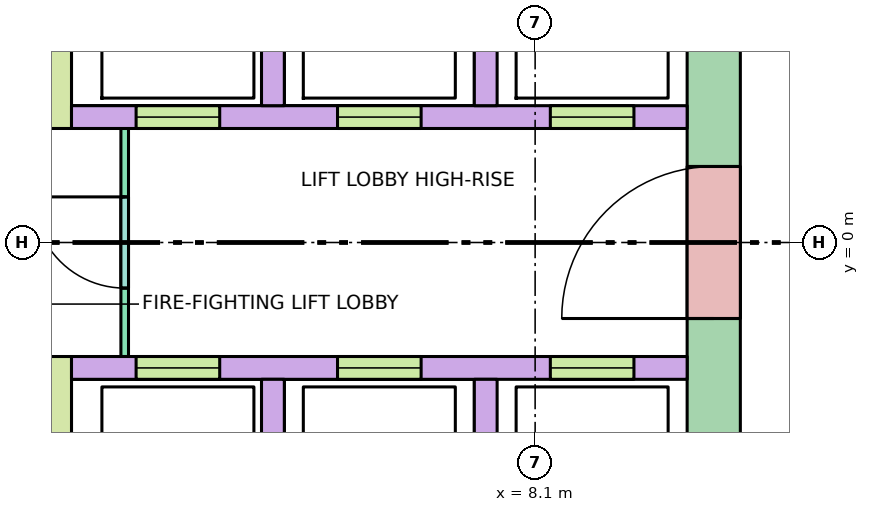
"""IFC4 building model, lengths in metres.
Left out: names, types, materials, properties, quantities, classifications, styles, units other than length and angle.
Written with IfcOpenShell. Run it as: python <this file> out.ifc"""

import sys

from ifc_helpers import new_model, si_unit, direction, frame, frame_2d, origin, place, context, subcontext, project, spatial, rectangle, extrude, element, fill, save


model = new_model("IFC4")
c1 = context("Model", 3, precision=1e-05, world=origin(), true_north=direction((0.0, 1.0)))
c2 = subcontext(c1, "Body", "Model", "MODEL_VIEW")
j1 = project(units=[si_unit("LENGTHUNIT", "METRE"), si_unit("PLANEANGLEUNIT", "RADIAN")], contexts=[c1])
p1 = place(None, origin())
s1 = spatial("IfcSite", under=j1, at=p1, CompositionType="ELEMENT")
p2 = place(p1, origin())
s2 = spatial("IfcBuilding", under=s1, at=p2, CompositionType="ELEMENT")
p3 = place(p2, frame((0.0, 0.0, 237.2)))
s3 = spatial("IfcBuildingStorey", under=s2, at=p3, CompositionType="ELEMENT", Elevation=237.2)
p4 = place(p3, frame((10.45, -5.13, -0.28), z_axis=(0.0, 0.0, 1.0), x_axis=(0.0, 1.0, 0.0)))
e1 = element("IfcWall", 1, at=p4, inside=s3, PredefinedType="SHEAR", context=c2, shape_type="SweptSolid", body=[
    extrude(rectangle(XDim=10.26, YDim=0.7, at=frame_2d((5.13, 0.0))), origin(), (0.0, 0.0, 1.0), 3.7),
])
p5 = place(p4, frame((4.13, 0.0, 0.28)))
e2 = element("IfcOpeningElement", 2, at=p5, cuts=e1, PredefinedType="OPENING", context=c2, shape_type="SweptSolid", body=[
    extrude(rectangle(XDim=2.0, YDim=2.1, at=frame_2d((1.0, 1.05))), frame((0.0, 0.36, 0.0), z_axis=(0.0, -1.0, 0.0), x_axis=(1.0, 0.0, 0.0)), (0.0, 0.0, 1.0), 0.72),
])
p6 = place(p3, frame((2.0, 1.65, 0.0), z_axis=(0.0, 0.0, 1.0), x_axis=(1.0, 0.0, 0.0)))
e3 = element("IfcWall", 3, at=p6, inside=s3, PredefinedType="SOLIDWALL", context=c2, shape_type="SweptSolid", body=[
    extrude(rectangle(XDim=8.1, YDim=0.3, at=frame_2d((4.05, 0.0))), origin(), (0.0, 0.0, 1.0), 3.42),
])
p7 = place(p6, frame((0.85, 0.0, 0.0)))
e4 = element("IfcOpeningElement", 4, at=p7, cuts=e3, PredefinedType="OPENING", context=c2, shape_type="SweptSolid", body=[
    extrude(rectangle(XDim=1.1, YDim=2.1, at=frame_2d((0.55, 1.05))), frame((0.0, 0.16, 0.0), z_axis=(0.0, -1.0, 0.0), x_axis=(1.0, 0.0, 0.0)), (0.0, 0.0, 1.0), 0.32),
])
p8 = place(p6, frame((3.5, 0.0, 0.0)))
e5 = element("IfcOpeningElement", 5, at=p8, cuts=e3, PredefinedType="OPENING", context=c2, shape_type="SweptSolid", body=[
    extrude(rectangle(XDim=1.1, YDim=2.1, at=frame_2d((0.55, 1.05))), frame((0.0, 0.16, 0.0), z_axis=(0.0, -1.0, 0.0), x_axis=(1.0, 0.0, 0.0)), (0.0, 0.0, 1.0), 0.32),
])
p9 = place(p6, frame((6.3, 0.0, 0.0)))
e6 = element("IfcOpeningElement", 6, at=p9, cuts=e3, PredefinedType="OPENING", context=c2, shape_type="SweptSolid", body=[
    extrude(rectangle(XDim=1.1, YDim=2.1, at=frame_2d((0.55, 1.05))), frame((0.0, 0.16, 0.0), z_axis=(0.0, -1.0, 0.0), x_axis=(1.0, 0.0, 0.0)), (0.0, 0.0, 1.0), 0.32),
])
p10 = place(p3, frame((2.0, -1.65, 0.0), z_axis=(0.0, 0.0, 1.0), x_axis=(1.0, 0.0, 0.0)))
e7 = element("IfcWall", 7, at=p10, inside=s3, PredefinedType="SOLIDWALL", context=c2, shape_type="SweptSolid", body=[
    extrude(rectangle(XDim=8.1, YDim=0.3, at=frame_2d((4.05, 0.0))), origin(), (0.0, 0.0, 1.0), 3.42),
])
p11 = place(p10, frame((0.85, 0.0, 0.0)))
e8 = element("IfcOpeningElement", 8, at=p11, cuts=e7, PredefinedType="OPENING", context=c2, shape_type="SweptSolid", body=[
    extrude(rectangle(XDim=1.1, YDim=2.1, at=frame_2d((0.55, 1.05))), frame((0.0, 0.16, 0.0), z_axis=(0.0, -1.0, 0.0), x_axis=(1.0, 0.0, 0.0)), (0.0, 0.0, 1.0), 0.32),
])
p12 = place(p10, frame((3.5, 0.0, 0.0)))
e9 = element("IfcOpeningElement", 9, at=p12, cuts=e7, PredefinedType="OPENING", context=c2, shape_type="SweptSolid", body=[
    extrude(rectangle(XDim=1.1, YDim=2.1, at=frame_2d((0.55, 1.05))), frame((0.0, 0.16, 0.0), z_axis=(0.0, -1.0, 0.0), x_axis=(1.0, 0.0, 0.0)), (0.0, 0.0, 1.0), 0.32),
])
p13 = place(p10, frame((6.3, 0.0, 0.0)))
e10 = element("IfcOpeningElement", 10, at=p13, cuts=e7, PredefinedType="OPENING", context=c2, shape_type="SweptSolid", body=[
    extrude(rectangle(XDim=1.1, YDim=2.1, at=frame_2d((0.55, 1.05))), frame((0.0, 0.16, 0.0), z_axis=(0.0, -1.0, 0.0), x_axis=(1.0, 0.0, 0.0)), (0.0, 0.0, 1.0), 0.32),
])
for number, where, z_axis, x_axis in (
    (11, (4.65, 1.8, 0.0), (0.0, 0.0, 1.0), (0.0, 1.0, 0.0)),
    (12, (4.65, -4.2, 0.0), (0.0, 0.0, 1.0), (0.0, 1.0, 0.0)),
    (13, (7.45, 1.8, 0.0), (0.0, 0.0, 1.0), (0.0, 1.0, 0.0)),
    (14, (7.45, -4.2, 0.0), (0.0, 0.0, 1.0), (0.0, 1.0, 0.0)),
):
    element("IfcWall", number, at=place(p3, frame(where, z_axis=z_axis, x_axis=x_axis)), inside=s3, PredefinedType="SOLIDWALL", context=c2, shape_type="SweptSolid", body=[
        extrude(rectangle(XDim=2.4, YDim=0.3, at=frame_2d((1.2, 0.0))), origin(), (0.0, 0.0, 1.0), 3.42),
    ])
for number, where, z_axis, x_axis in (
    (15, (1.85, 1.5, 0.0), (0.0, 0.0, 1.0), (0.0, 1.0, 0.0)),
    (16, (1.85, -8.1, 0.0), (0.0, 0.0, 1.0), (0.0, 1.0, 0.0)),
):
    element("IfcWall", number, at=place(p3, frame(where, z_axis=z_axis, x_axis=x_axis)), inside=s3, PredefinedType="SHEAR", context=c2, shape_type="SweptSolid", body=[
        extrude(rectangle(XDim=6.6, YDim=0.3, at=frame_2d((3.3, 0.0))), origin(), (0.0, 0.0, 1.0), 3.42),
    ])
p14 = place(p3, frame((2.7, -1.5, 0.0), z_axis=(0.0, 0.0, 1.0), x_axis=(0.0, 1.0, 0.0)))
e17 = element("IfcWall", 17, at=p14, inside=s3, PredefinedType="PARTITIONING", context=c2, shape_type="SweptSolid", body=[
    extrude(rectangle(XDim=3.0, YDim=0.1, at=frame_2d((1.5, 0.0))), origin(), (0.0, 0.0, 1.0), 3.42),
])
p15 = place(p14, frame((0.9, 0.0, 0.0)))
e18 = element("IfcOpeningElement", 18, at=p15, cuts=e17, PredefinedType="OPENING", context=c2, shape_type="SweptSolid", body=[
    extrude(rectangle(XDim=1.2, YDim=2.1, at=frame_2d((0.6, 1.05))), frame((0.0, 0.06, 0.0), z_axis=(0.0, -1.0, 0.0), x_axis=(1.0, 0.0, 0.0)), (0.0, 0.0, 1.0), 0.12),
])
p16 = place(p7, origin())
e19 = element("IfcDoor", 19, at=p16, inside=s3, OperationType="DOUBLE_DOOR_SLIDING", PredefinedType="DOOR", context=c2, shape_type="SweptSolid", body=[
    extrude(rectangle(XDim=1.1, YDim=2.1, at=frame_2d((0.55, 1.05))), frame((0.0, 0.025, 0.0), z_axis=(0.0, -1.0, 0.0), x_axis=(1.0, 0.0, 0.0)), (0.0, 0.0, 1.0), 0.05),
])
fill(e4, e19)
p17 = place(p8, origin())
e20 = element("IfcDoor", 20, at=p17, inside=s3, OperationType="DOUBLE_DOOR_SLIDING", PredefinedType="DOOR", context=c2, shape_type="SweptSolid", body=[
    extrude(rectangle(XDim=1.1, YDim=2.1, at=frame_2d((0.55, 1.05))), frame((0.0, 0.025, 0.0), z_axis=(0.0, -1.0, 0.0), x_axis=(1.0, 0.0, 0.0)), (0.0, 0.0, 1.0), 0.05),
])
fill(e5, e20)
p18 = place(p9, origin())
e21 = element("IfcDoor", 21, at=p18, inside=s3, OperationType="DOUBLE_DOOR_SLIDING", PredefinedType="DOOR", context=c2, shape_type="SweptSolid", body=[
    extrude(rectangle(XDim=1.1, YDim=2.1, at=frame_2d((0.55, 1.05))), frame((0.0, 0.025, 0.0), z_axis=(0.0, -1.0, 0.0), x_axis=(1.0, 0.0, 0.0)), (0.0, 0.0, 1.0), 0.05),
])
fill(e6, e21)
p19 = place(p11, origin())
e22 = element("IfcDoor", 22, at=p19, inside=s3, OperationType="DOUBLE_DOOR_SLIDING", PredefinedType="DOOR", context=c2, shape_type="SweptSolid", body=[
    extrude(rectangle(XDim=1.1, YDim=2.1, at=frame_2d((0.55, 1.05))), frame((0.0, 0.025, 0.0), z_axis=(0.0, -1.0, 0.0), x_axis=(1.0, 0.0, 0.0)), (0.0, 0.0, 1.0), 0.05),
])
fill(e8, e22)
p20 = place(p12, origin())
e23 = element("IfcDoor", 23, at=p20, inside=s3, OperationType="DOUBLE_DOOR_SLIDING", PredefinedType="DOOR", context=c2, shape_type="SweptSolid", body=[
    extrude(rectangle(XDim=1.1, YDim=2.1, at=frame_2d((0.55, 1.05))), frame((0.0, 0.025, 0.0), z_axis=(0.0, -1.0, 0.0), x_axis=(1.0, 0.0, 0.0)), (0.0, 0.0, 1.0), 0.05),
])
fill(e9, e23)
p21 = place(p13, origin())
e24 = element("IfcDoor", 24, at=p21, inside=s3, OperationType="DOUBLE_DOOR_SLIDING", PredefinedType="DOOR", context=c2, shape_type="SweptSolid", body=[
    extrude(rectangle(XDim=1.1, YDim=2.1, at=frame_2d((0.55, 1.05))), frame((0.0, 0.025, 0.0), z_axis=(0.0, -1.0, 0.0), x_axis=(1.0, 0.0, 0.0)), (0.0, 0.0, 1.0), 0.05),
])
fill(e10, e24)
p22 = place(p5, origin())
e25 = element("IfcDoor", 25, at=p22, inside=s3, OperationType="DOUBLE_DOOR_SINGLE_SWING", PredefinedType="DOOR", context=c2, shape_type="SweptSolid", body=[
    extrude(rectangle(XDim=2.0, YDim=2.1, at=frame_2d((1.0, 1.05))), frame((0.0, 0.025, 0.0), z_axis=(0.0, -1.0, 0.0), x_axis=(1.0, 0.0, 0.0)), (0.0, 0.0, 1.0), 0.05),
])
fill(e2, e25)
p23 = place(p15, origin())
e26 = element("IfcDoor", 26, at=p23, inside=s3, OperationType="SINGLE_SWING_RIGHT", PredefinedType="DOOR", context=c2, shape_type="SweptSolid", body=[
    extrude(rectangle(XDim=1.2, YDim=2.1, at=frame_2d((0.6, 1.05))), frame((0.0, 0.025, 0.0), z_axis=(0.0, -1.0, 0.0), x_axis=(1.0, 0.0, 0.0)), (0.0, 0.0, 1.0), 0.05),
])
fill(e18, e26)
save(model, sys.argv[1])
